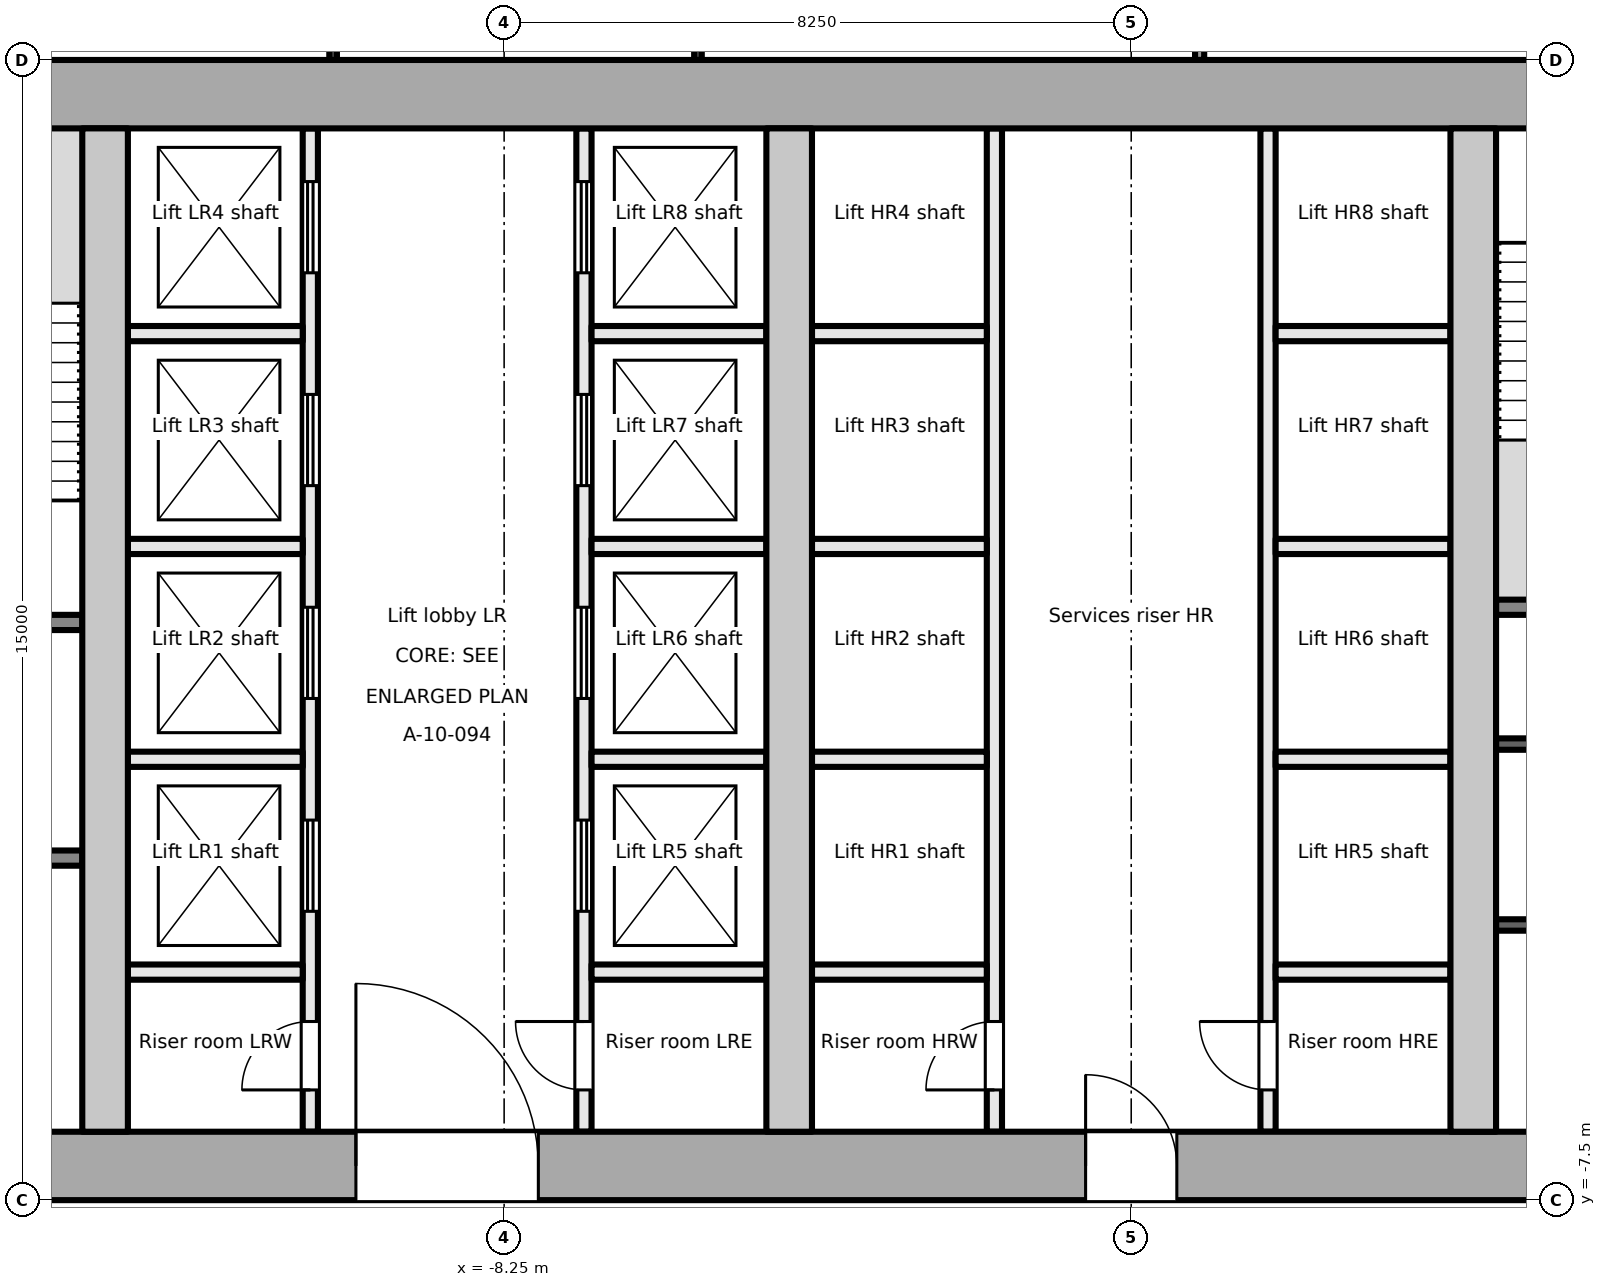
"""IFC4 building model, lengths in metres.
Left out: names, types, materials, properties, quantities, classifications, styles, units other than length and angle.
Written with IfcOpenShell. Run it as: python <this file> out.ifc"""

import sys

from ifc_helpers import new_model, si_unit, direction, frame, frame_2d, origin, place, context, subcontext, project, spatial, rectangle, extrude, element, fill, save


model = new_model("IFC4")
c1 = context("Model", 3, precision=1e-05, world=origin(), true_north=direction((0.0, 1.0)))
c2 = subcontext(c1, "Body", "Model", "MODEL_VIEW")
j1 = project(units=[si_unit("LENGTHUNIT", "METRE"), si_unit("PLANEANGLEUNIT", "RADIAN")], contexts=[c1])
p1 = place(None, origin())
s1 = spatial("IfcSite", under=j1, at=p1, CompositionType="ELEMENT")
p2 = place(p1, origin())
s2 = spatial("IfcBuilding", under=s1, at=p2, CompositionType="ELEMENT")
p3 = place(p2, frame((0.0, 0.0, 103.7)))
s3 = spatial("IfcBuildingStorey", under=s2, at=p3, CompositionType="ELEMENT", Elevation=103.7)
p4 = place(p3, frame((-18.0, -7.05, -0.2), z_axis=(0.0, 0.0, 1.0), x_axis=(1.0, 0.0, 0.0)))
e1 = element("IfcWall", 1, at=p4, inside=s3, PredefinedType="SHEAR", context=c2, shape_type="SweptSolid", body=[
    extrude(rectangle(XDim=36.0, YDim=0.9, at=frame_2d((18.0, 0.0))), origin(), (0.0, 0.0, 1.0), 4.0),
])
p5 = place(p4, frame((7.8, 0.0, 0.2)))
e2 = element("IfcOpeningElement", 2, at=p5, cuts=e1, PredefinedType="OPENING", context=c2, shape_type="SweptSolid", body=[
    extrude(rectangle(XDim=2.4, YDim=2.1, at=frame_2d((1.2, 1.05))), frame((0.0, 0.46, 0.0), z_axis=(0.0, -1.0, 0.0), x_axis=(1.0, 0.0, 0.0)), (0.0, 0.0, 1.0), 0.921),
])
p6 = place(p4, frame((17.4, 0.0, 0.2)))
e3 = element("IfcOpeningElement", 3, at=p6, cuts=e1, PredefinedType="OPENING", context=c2, shape_type="SweptSolid", body=[
    extrude(rectangle(XDim=1.2, YDim=2.1, at=frame_2d((0.6, 1.05))), frame((0.0, 0.46, 0.0), z_axis=(0.0, -1.0, 0.0), x_axis=(1.0, 0.0, 0.0)), (0.0, 0.0, 1.0), 0.921),
])
p7 = place(p4, frame((26.1, 0.0, 0.2)))
e4 = element("IfcOpeningElement", 4, at=p7, cuts=e1, PredefinedType="OPENING", context=c2, shape_type="SweptSolid", body=[
    extrude(rectangle(XDim=2.4, YDim=2.1, at=frame_2d((1.2, 1.05))), frame((0.0, 0.46, 0.0), z_axis=(0.0, -1.0, 0.0), x_axis=(1.0, 0.0, 0.0)), (0.0, 0.0, 1.0), 0.921),
])
p8 = place(p3, frame((-18.0, 7.05, -0.2), z_axis=(0.0, 0.0, 1.0), x_axis=(1.0, 0.0, 0.0)))
e5 = element("IfcWall", 5, at=p8, inside=s3, PredefinedType="SHEAR", context=c2, shape_type="SweptSolid", body=[
    extrude(rectangle(XDim=36.0, YDim=0.9, at=frame_2d((18.0, 0.0))), origin(), (0.0, 0.0, 1.0), 4.0),
])
for number, where, z_axis, x_axis in (
    (6, (-13.5, -6.6, -0.2), (0.0, 0.0, 1.0), (0.0, 1.0, 0.0)),
    (7, (-4.5, -6.6, -0.2), (0.0, 0.0, 1.0), (0.0, 1.0, 0.0)),
    (8, (4.5, -6.6, -0.2), (0.0, 0.0, 1.0), (0.0, 1.0, 0.0)),
):
    element("IfcWall", number, at=place(p3, frame(where, z_axis=z_axis, x_axis=x_axis)), inside=s3, PredefinedType="SHEAR", context=c2, shape_type="SweptSolid", body=[
        extrude(rectangle(XDim=13.2, YDim=0.6, at=frame_2d((6.6, 0.0))), origin(), (0.0, 0.0, 1.0), 4.0),
    ])
p9 = place(p3, frame((-17.1, -3.0, 0.0), z_axis=(0.0, 0.0, 1.0), x_axis=(1.0, 0.0, 0.0)))
e9 = element("IfcWall", 9, at=p9, inside=s3, PredefinedType="PARTITIONING", context=c2, shape_type="SweptSolid", body=[
    extrude(rectangle(XDim=3.3, YDim=0.2, at=frame_2d((1.65, 0.0))), origin(), (0.0, 0.0, 1.0), 3.8),
])
p10 = place(p9, frame((1.1, 0.0, 0.0)))
e10 = element("IfcOpeningElement", 10, at=p10, cuts=e9, PredefinedType="OPENING", context=c2, shape_type="SweptSolid", body=[
    extrude(rectangle(XDim=1.1, YDim=2.1, at=frame_2d((0.55, 1.05))), frame((0.0, 0.111, 0.0), z_axis=(0.0, -1.0, 0.0), x_axis=(1.0, 0.0, 0.0)), (0.0, 0.0, 1.0), 0.221),
])
p11 = place(p3, frame((-17.1, 0.1, 0.0), z_axis=(0.0, 0.0, 1.0), x_axis=(1.0, 0.0, 0.0)))
e11 = element("IfcWall", 11, at=p11, inside=s3, PredefinedType="PARTITIONING", context=c2, shape_type="SweptSolid", body=[
    extrude(rectangle(XDim=3.3, YDim=0.2, at=frame_2d((1.65, 0.0))), origin(), (0.0, 0.0, 1.0), 3.8),
])
p12 = place(p11, frame((1.1, 0.0, 0.0)))
e12 = element("IfcOpeningElement", 12, at=p12, cuts=e11, PredefinedType="OPENING", context=c2, shape_type="SweptSolid", body=[
    extrude(rectangle(XDim=1.1, YDim=2.1, at=frame_2d((0.55, 1.05))), frame((0.0, 0.111, 0.0), z_axis=(0.0, -1.0, 0.0), x_axis=(1.0, 0.0, 0.0)), (0.0, 0.0, 1.0), 0.221),
])
p13 = place(p3, frame((-10.8, -6.6, 0.0), z_axis=(0.0, 0.0, 1.0), x_axis=(0.0, 1.0, 0.0)))
e13 = element("IfcWall", 13, at=p13, inside=s3, PredefinedType="PARTITIONING", context=c2, shape_type="SweptSolid", body=[
    extrude(rectangle(XDim=13.2, YDim=0.2, at=frame_2d((6.6, 0.0))), origin(), (0.0, 0.0, 1.0), 3.8),
])
p14 = place(p13, frame((0.55, 0.0, 0.0)))
e14 = element("IfcOpeningElement", 14, at=p14, cuts=e13, PredefinedType="OPENING", context=c2, shape_type="SweptSolid", body=[
    extrude(rectangle(XDim=0.9, YDim=2.1, at=frame_2d((0.45, 1.05))), frame((0.0, 0.111, 0.0), z_axis=(0.0, -1.0, 0.0), x_axis=(1.0, 0.0, 0.0)), (0.0, 0.0, 1.0), 0.221),
])
p15 = place(p13, frame((2.9, 0.0, 0.0)))
e15 = element("IfcOpeningElement", 15, at=p15, cuts=e13, PredefinedType="OPENING", context=c2, shape_type="SweptSolid", body=[
    extrude(rectangle(XDim=1.2, YDim=2.1, at=frame_2d((0.6, 1.05))), frame((0.0, 0.111, 0.0), z_axis=(0.0, -1.0, 0.0), x_axis=(1.0, 0.0, 0.0)), (0.0, 0.0, 1.0), 0.221),
])
p16 = place(p13, frame((5.7, 0.0, 0.0)))
e16 = element("IfcOpeningElement", 16, at=p16, cuts=e13, PredefinedType="OPENING", context=c2, shape_type="SweptSolid", body=[
    extrude(rectangle(XDim=1.2, YDim=2.1, at=frame_2d((0.6, 1.05))), frame((0.0, 0.111, 0.0), z_axis=(0.0, -1.0, 0.0), x_axis=(1.0, 0.0, 0.0)), (0.0, 0.0, 1.0), 0.221),
])
p17 = place(p13, frame((8.5, 0.0, 0.0)))
e17 = element("IfcOpeningElement", 17, at=p17, cuts=e13, PredefinedType="OPENING", context=c2, shape_type="SweptSolid", body=[
    extrude(rectangle(XDim=1.2, YDim=2.1, at=frame_2d((0.6, 1.05))), frame((0.0, 0.111, 0.0), z_axis=(0.0, -1.0, 0.0), x_axis=(1.0, 0.0, 0.0)), (0.0, 0.0, 1.0), 0.221),
])
p18 = place(p13, frame((11.3, 0.0, 0.0)))
e18 = element("IfcOpeningElement", 18, at=p18, cuts=e13, PredefinedType="OPENING", context=c2, shape_type="SweptSolid", body=[
    extrude(rectangle(XDim=1.2, YDim=2.1, at=frame_2d((0.6, 1.05))), frame((0.0, 0.111, 0.0), z_axis=(0.0, -1.0, 0.0), x_axis=(1.0, 0.0, 0.0)), (0.0, 0.0, 1.0), 0.221),
])
p19 = place(p3, frame((-7.2, -6.6, 0.0), z_axis=(0.0, 0.0, 1.0), x_axis=(0.0, 1.0, 0.0)))
e19 = element("IfcWall", 19, at=p19, inside=s3, PredefinedType="PARTITIONING", context=c2, shape_type="SweptSolid", body=[
    extrude(rectangle(XDim=13.2, YDim=0.2, at=frame_2d((6.6, 0.0))), origin(), (0.0, 0.0, 1.0), 3.8),
])
p20 = place(p19, frame((0.55, 0.0, 0.0)))
e20 = element("IfcOpeningElement", 20, at=p20, cuts=e19, PredefinedType="OPENING", context=c2, shape_type="SweptSolid", body=[
    extrude(rectangle(XDim=0.9, YDim=2.1, at=frame_2d((0.45, 1.05))), frame((0.0, 0.111, 0.0), z_axis=(0.0, -1.0, 0.0), x_axis=(1.0, 0.0, 0.0)), (0.0, 0.0, 1.0), 0.221),
])
p21 = place(p19, frame((2.9, 0.0, 0.0)))
e21 = element("IfcOpeningElement", 21, at=p21, cuts=e19, PredefinedType="OPENING", context=c2, shape_type="SweptSolid", body=[
    extrude(rectangle(XDim=1.2, YDim=2.1, at=frame_2d((0.6, 1.05))), frame((0.0, 0.111, 0.0), z_axis=(0.0, -1.0, 0.0), x_axis=(1.0, 0.0, 0.0)), (0.0, 0.0, 1.0), 0.221),
])
p22 = place(p19, frame((5.7, 0.0, 0.0)))
e22 = element("IfcOpeningElement", 22, at=p22, cuts=e19, PredefinedType="OPENING", context=c2, shape_type="SweptSolid", body=[
    extrude(rectangle(XDim=1.2, YDim=2.1, at=frame_2d((0.6, 1.05))), frame((0.0, 0.111, 0.0), z_axis=(0.0, -1.0, 0.0), x_axis=(1.0, 0.0, 0.0)), (0.0, 0.0, 1.0), 0.221),
])
p23 = place(p19, frame((8.5, 0.0, 0.0)))
e23 = element("IfcOpeningElement", 23, at=p23, cuts=e19, PredefinedType="OPENING", context=c2, shape_type="SweptSolid", body=[
    extrude(rectangle(XDim=1.2, YDim=2.1, at=frame_2d((0.6, 1.05))), frame((0.0, 0.111, 0.0), z_axis=(0.0, -1.0, 0.0), x_axis=(1.0, 0.0, 0.0)), (0.0, 0.0, 1.0), 0.221),
])
p24 = place(p19, frame((11.3, 0.0, 0.0)))
e24 = element("IfcOpeningElement", 24, at=p24, cuts=e19, PredefinedType="OPENING", context=c2, shape_type="SweptSolid", body=[
    extrude(rectangle(XDim=1.2, YDim=2.1, at=frame_2d((0.6, 1.05))), frame((0.0, 0.111, 0.0), z_axis=(0.0, -1.0, 0.0), x_axis=(1.0, 0.0, 0.0)), (0.0, 0.0, 1.0), 0.221),
])
for number, where, z_axis, x_axis in (
    (25, (-13.2, -1.7, 0.0), (0.0, 0.0, 1.0), (1.0, 0.0, 0.0)),
    (26, (-13.2, 1.1, 0.0), (0.0, 0.0, 1.0), (1.0, 0.0, 0.0)),
    (27, (-13.2, 3.9, 0.0), (0.0, 0.0, 1.0), (1.0, 0.0, 0.0)),
    (28, (-13.2, -4.5, 0.0), (0.0, 0.0, 1.0), (1.0, 0.0, 0.0)),
    (29, (-7.1, -1.7, 0.0), (0.0, 0.0, 1.0), (1.0, 0.0, 0.0)),
    (30, (-7.1, 1.1, 0.0), (0.0, 0.0, 1.0), (1.0, 0.0, 0.0)),
    (31, (-7.1, 3.9, 0.0), (0.0, 0.0, 1.0), (1.0, 0.0, 0.0)),
    (32, (-7.1, -4.5, 0.0), (0.0, 0.0, 1.0), (1.0, 0.0, 0.0)),
):
    element("IfcWall", number, at=place(p3, frame(where, z_axis=z_axis, x_axis=x_axis)), inside=s3, PredefinedType="PARTITIONING", context=c2, shape_type="SweptSolid", body=[
        extrude(rectangle(XDim=2.3, YDim=0.2, at=frame_2d((1.15, 0.0))), origin(), (0.0, 0.0, 1.0), 3.8),
    ])
p25 = place(p3, frame((-1.8, -6.6, 0.0), z_axis=(0.0, 0.0, 1.0), x_axis=(0.0, 1.0, 0.0)))
e33 = element("IfcWall", 33, at=p25, inside=s3, PredefinedType="PARTITIONING", context=c2, shape_type="SweptSolid", body=[
    extrude(rectangle(XDim=13.2, YDim=0.2, at=frame_2d((6.6, 0.0))), origin(), (0.0, 0.0, 1.0), 3.8),
])
p26 = place(p25, frame((0.55, 0.0, 0.0)))
e34 = element("IfcOpeningElement", 34, at=p26, cuts=e33, PredefinedType="OPENING", context=c2, shape_type="SweptSolid", body=[
    extrude(rectangle(XDim=0.9, YDim=2.1, at=frame_2d((0.45, 1.05))), frame((0.0, 0.111, 0.0), z_axis=(0.0, -1.0, 0.0), x_axis=(1.0, 0.0, 0.0)), (0.0, 0.0, 1.0), 0.221),
])
p27 = place(p3, frame((1.8, -6.6, 0.0), z_axis=(0.0, 0.0, 1.0), x_axis=(0.0, 1.0, 0.0)))
e35 = element("IfcWall", 35, at=p27, inside=s3, PredefinedType="PARTITIONING", context=c2, shape_type="SweptSolid", body=[
    extrude(rectangle(XDim=13.2, YDim=0.2, at=frame_2d((6.6, 0.0))), origin(), (0.0, 0.0, 1.0), 3.8),
])
p28 = place(p27, frame((0.55, 0.0, 0.0)))
e36 = element("IfcOpeningElement", 36, at=p28, cuts=e35, PredefinedType="OPENING", context=c2, shape_type="SweptSolid", body=[
    extrude(rectangle(XDim=0.9, YDim=2.1, at=frame_2d((0.45, 1.05))), frame((0.0, 0.111, 0.0), z_axis=(0.0, -1.0, 0.0), x_axis=(1.0, 0.0, 0.0)), (0.0, 0.0, 1.0), 0.221),
])
for number, where, z_axis, x_axis in (
    (37, (-4.2, -1.7, 0.0), (0.0, 0.0, 1.0), (1.0, 0.0, 0.0)),
    (38, (-4.2, 1.1, 0.0), (0.0, 0.0, 1.0), (1.0, 0.0, 0.0)),
    (39, (-4.2, 3.9, 0.0), (0.0, 0.0, 1.0), (1.0, 0.0, 0.0)),
    (40, (-4.2, -4.5, 0.0), (0.0, 0.0, 1.0), (1.0, 0.0, 0.0)),
    (41, (1.9, -1.7, 0.0), (0.0, 0.0, 1.0), (1.0, 0.0, 0.0)),
    (42, (1.9, 1.1, 0.0), (0.0, 0.0, 1.0), (1.0, 0.0, 0.0)),
    (43, (1.9, 3.9, 0.0), (0.0, 0.0, 1.0), (1.0, 0.0, 0.0)),
    (44, (1.9, -4.5, 0.0), (0.0, 0.0, 1.0), (1.0, 0.0, 0.0)),
):
    element("IfcWall", number, at=place(p3, frame(where, z_axis=z_axis, x_axis=x_axis)), inside=s3, PredefinedType="PARTITIONING", context=c2, shape_type="SweptSolid", body=[
        extrude(rectangle(XDim=2.3, YDim=0.2, at=frame_2d((1.15, 0.0))), origin(), (0.0, 0.0, 1.0), 3.8),
    ])
p29 = place(p3, frame((4.8, 0.3, 0.0), z_axis=(0.0, 0.0, 1.0), x_axis=(1.0, 0.0, 0.0)))
e45 = element("IfcWall", 45, at=p29, inside=s3, PredefinedType="PARTITIONING", context=c2, shape_type="SweptSolid", body=[
    extrude(rectangle(XDim=3.15, YDim=0.2, at=frame_2d((1.575, 0.0))), origin(), (0.0, 0.0, 1.0), 3.8),
])
for number, where, z_axis, x_axis in (
    (46, (4.8, -3.88, 0.0), (0.0, 0.0, 1.0), (1.0, 0.0, 0.0)),
    (47, (4.8, -1.5, 0.0), (0.0, 0.0, 1.0), (1.0, 0.0, 0.0)),
):
    element("IfcWall", number, at=place(p3, frame(where, z_axis=z_axis, x_axis=x_axis)), inside=s3, PredefinedType="PARTITIONING", context=c2, shape_type="SweptSolid", body=[
        extrude(rectangle(XDim=3.15, YDim=0.15, at=frame_2d((1.575, 0.0))), origin(), (0.0, 0.0, 1.0), 3.8),
    ])
p30 = place(p3, frame((-10.5, 10.45, 0.0), z_axis=(0.0, 0.0, 1.0), x_axis=(0.0, -1.0, 0.0)))
e48 = element("IfcWall", 48, at=p30, inside=s3, PredefinedType="PARTITIONING", context=c2, shape_type="SweptSolid", body=[
    extrude(rectangle(XDim=2.95, YDim=0.1, at=frame_2d((1.475, 0.0))), origin(), (0.0, 0.0, 1.0), 3.8),
])
p31 = place(p30, frame((1.075, 0.0, 0.0)))
e49 = element("IfcOpeningElement", 49, at=p31, cuts=e48, PredefinedType="OPENING", context=c2, shape_type="SweptSolid", body=[
    extrude(rectangle(XDim=0.8, YDim=2.1, at=frame_2d((0.4, 1.05))), frame((0.0, 0.061, 0.0), z_axis=(0.0, -1.0, 0.0), x_axis=(1.0, 0.0, 0.0)), (0.0, 0.0, 1.0), 0.121),
])
p32 = place(p3, frame((-5.7, 10.45, 0.0), z_axis=(0.0, 0.0, 1.0), x_axis=(0.0, -1.0, 0.0)))
e50 = element("IfcWall", 50, at=p32, inside=s3, PredefinedType="PARTITIONING", context=c2, shape_type="SweptSolid", body=[
    extrude(rectangle(XDim=2.95, YDim=0.1, at=frame_2d((1.475, 0.0))), origin(), (0.0, 0.0, 1.0), 3.8),
])
p33 = place(p32, frame((1.025, 0.0, 0.0)))
e51 = element("IfcOpeningElement", 51, at=p33, cuts=e50, PredefinedType="OPENING", context=c2, shape_type="SweptSolid", body=[
    extrude(rectangle(XDim=0.9, YDim=2.1, at=frame_2d((0.45, 1.05))), frame((0.0, 0.061, 0.0), z_axis=(0.0, -1.0, 0.0), x_axis=(1.0, 0.0, 0.0)), (0.0, 0.0, 1.0), 0.121),
])
p34 = place(p3, frame((0.9, 10.44, 0.0), z_axis=(0.0, 0.0, 1.0), x_axis=(0.0, -1.0, 0.0)))
e52 = element("IfcWall", 52, at=p34, inside=s3, PredefinedType="PARTITIONING", context=c2, shape_type="SweptSolid", body=[
    extrude(rectangle(XDim=2.94, YDim=0.12, at=frame_2d((1.47, 0.0))), origin(), (0.0, 0.0, 1.0), 3.8),
])
p35 = place(p14, origin())
e53 = element("IfcDoor", 53, at=p35, inside=s3, OperationType="SINGLE_SWING_LEFT", PredefinedType="DOOR", context=c2, shape_type="SweptSolid", body=[
    extrude(rectangle(XDim=0.9, YDim=2.1, at=frame_2d((0.45, 1.05))), frame((0.0, 0.025, 0.0), z_axis=(0.0, -1.0, 0.0), x_axis=(1.0, 0.0, 0.0)), (0.0, 0.0, 1.0), 0.05),
])
fill(e14, e53)
p36 = place(p15, origin())
e54 = element("IfcDoor", 54, at=p36, inside=s3, OperationType="DOUBLE_DOOR_SLIDING", PredefinedType="DOOR", context=c2, shape_type="SweptSolid", body=[
    extrude(rectangle(XDim=1.2, YDim=2.1, at=frame_2d((0.6, 1.05))), frame((0.0, 0.025, 0.0), z_axis=(0.0, -1.0, 0.0), x_axis=(1.0, 0.0, 0.0)), (0.0, 0.0, 1.0), 0.05),
])
fill(e15, e54)
p37 = place(p16, origin())
e55 = element("IfcDoor", 55, at=p37, inside=s3, OperationType="DOUBLE_DOOR_SLIDING", PredefinedType="DOOR", context=c2, shape_type="SweptSolid", body=[
    extrude(rectangle(XDim=1.2, YDim=2.1, at=frame_2d((0.6, 1.05))), frame((0.0, 0.025, 0.0), z_axis=(0.0, -1.0, 0.0), x_axis=(1.0, 0.0, 0.0)), (0.0, 0.0, 1.0), 0.05),
])
fill(e16, e55)
p38 = place(p17, origin())
e56 = element("IfcDoor", 56, at=p38, inside=s3, OperationType="DOUBLE_DOOR_SLIDING", PredefinedType="DOOR", context=c2, shape_type="SweptSolid", body=[
    extrude(rectangle(XDim=1.2, YDim=2.1, at=frame_2d((0.6, 1.05))), frame((0.0, 0.025, 0.0), z_axis=(0.0, -1.0, 0.0), x_axis=(1.0, 0.0, 0.0)), (0.0, 0.0, 1.0), 0.05),
])
fill(e17, e56)
p39 = place(p18, origin())
e57 = element("IfcDoor", 57, at=p39, inside=s3, OperationType="DOUBLE_DOOR_SLIDING", PredefinedType="DOOR", context=c2, shape_type="SweptSolid", body=[
    extrude(rectangle(XDim=1.2, YDim=2.1, at=frame_2d((0.6, 1.05))), frame((0.0, 0.025, 0.0), z_axis=(0.0, -1.0, 0.0), x_axis=(1.0, 0.0, 0.0)), (0.0, 0.0, 1.0), 0.05),
])
fill(e18, e57)
p40 = place(p20, origin())
e58 = element("IfcDoor", 58, at=p40, inside=s3, OperationType="SINGLE_SWING_RIGHT", PredefinedType="DOOR", context=c2, shape_type="SweptSolid", body=[
    extrude(rectangle(XDim=0.9, YDim=2.1, at=frame_2d((0.45, 1.05))), frame((0.0, 0.025, 0.0), z_axis=(0.0, -1.0, 0.0), x_axis=(1.0, 0.0, 0.0)), (0.0, 0.0, 1.0), 0.05),
])
fill(e20, e58)
p41 = place(p21, origin())
e59 = element("IfcDoor", 59, at=p41, inside=s3, OperationType="DOUBLE_DOOR_SLIDING", PredefinedType="DOOR", context=c2, shape_type="SweptSolid", body=[
    extrude(rectangle(XDim=1.2, YDim=2.1, at=frame_2d((0.6, 1.05))), frame((0.0, 0.025, 0.0), z_axis=(0.0, -1.0, 0.0), x_axis=(1.0, 0.0, 0.0)), (0.0, 0.0, 1.0), 0.05),
])
fill(e21, e59)
p42 = place(p22, origin())
e60 = element("IfcDoor", 60, at=p42, inside=s3, OperationType="DOUBLE_DOOR_SLIDING", PredefinedType="DOOR", context=c2, shape_type="SweptSolid", body=[
    extrude(rectangle(XDim=1.2, YDim=2.1, at=frame_2d((0.6, 1.05))), frame((0.0, 0.025, 0.0), z_axis=(0.0, -1.0, 0.0), x_axis=(1.0, 0.0, 0.0)), (0.0, 0.0, 1.0), 0.05),
])
fill(e22, e60)
p43 = place(p23, origin())
e61 = element("IfcDoor", 61, at=p43, inside=s3, OperationType="DOUBLE_DOOR_SLIDING", PredefinedType="DOOR", context=c2, shape_type="SweptSolid", body=[
    extrude(rectangle(XDim=1.2, YDim=2.1, at=frame_2d((0.6, 1.05))), frame((0.0, 0.025, 0.0), z_axis=(0.0, -1.0, 0.0), x_axis=(1.0, 0.0, 0.0)), (0.0, 0.0, 1.0), 0.05),
])
fill(e23, e61)
p44 = place(p24, origin())
e62 = element("IfcDoor", 62, at=p44, inside=s3, OperationType="DOUBLE_DOOR_SLIDING", PredefinedType="DOOR", context=c2, shape_type="SweptSolid", body=[
    extrude(rectangle(XDim=1.2, YDim=2.1, at=frame_2d((0.6, 1.05))), frame((0.0, 0.025, 0.0), z_axis=(0.0, -1.0, 0.0), x_axis=(1.0, 0.0, 0.0)), (0.0, 0.0, 1.0), 0.05),
])
fill(e24, e62)
p45 = place(p5, origin())
e63 = element("IfcDoor", 63, at=p45, inside=s3, OperationType="DOUBLE_DOOR_DOUBLE_SWING", PredefinedType="DOOR", context=c2, shape_type="SweptSolid", body=[
    extrude(rectangle(XDim=2.4, YDim=2.1, at=frame_2d((1.2, 1.05))), frame((0.0, 0.025, 0.0), z_axis=(0.0, -1.0, 0.0), x_axis=(1.0, 0.0, 0.0)), (0.0, 0.0, 1.0), 0.05),
])
fill(e2, e63)
p46 = place(p26, origin())
e64 = element("IfcDoor", 64, at=p46, inside=s3, OperationType="SINGLE_SWING_LEFT", PredefinedType="DOOR", context=c2, shape_type="SweptSolid", body=[
    extrude(rectangle(XDim=0.9, YDim=2.1, at=frame_2d((0.45, 1.05))), frame((0.0, 0.025, 0.0), z_axis=(0.0, -1.0, 0.0), x_axis=(1.0, 0.0, 0.0)), (0.0, 0.0, 1.0), 0.05),
])
fill(e34, e64)
p47 = place(p28, origin())
e65 = element("IfcDoor", 65, at=p47, inside=s3, OperationType="SINGLE_SWING_RIGHT", PredefinedType="DOOR", context=c2, shape_type="SweptSolid", body=[
    extrude(rectangle(XDim=0.9, YDim=2.1, at=frame_2d((0.45, 1.05))), frame((0.0, 0.025, 0.0), z_axis=(0.0, -1.0, 0.0), x_axis=(1.0, 0.0, 0.0)), (0.0, 0.0, 1.0), 0.05),
])
fill(e36, e65)
p48 = place(p6, origin())
e66 = element("IfcDoor", 66, at=p48, inside=s3, OperationType="SINGLE_SWING_LEFT", PredefinedType="DOOR", context=c2, shape_type="SweptSolid", body=[
    extrude(rectangle(XDim=1.2, YDim=2.1, at=frame_2d((0.6, 1.05))), frame((0.0, 0.025, 0.0), z_axis=(0.0, -1.0, 0.0), x_axis=(1.0, 0.0, 0.0)), (0.0, 0.0, 1.0), 0.05),
])
fill(e3, e66)
save(model, sys.argv[1])
